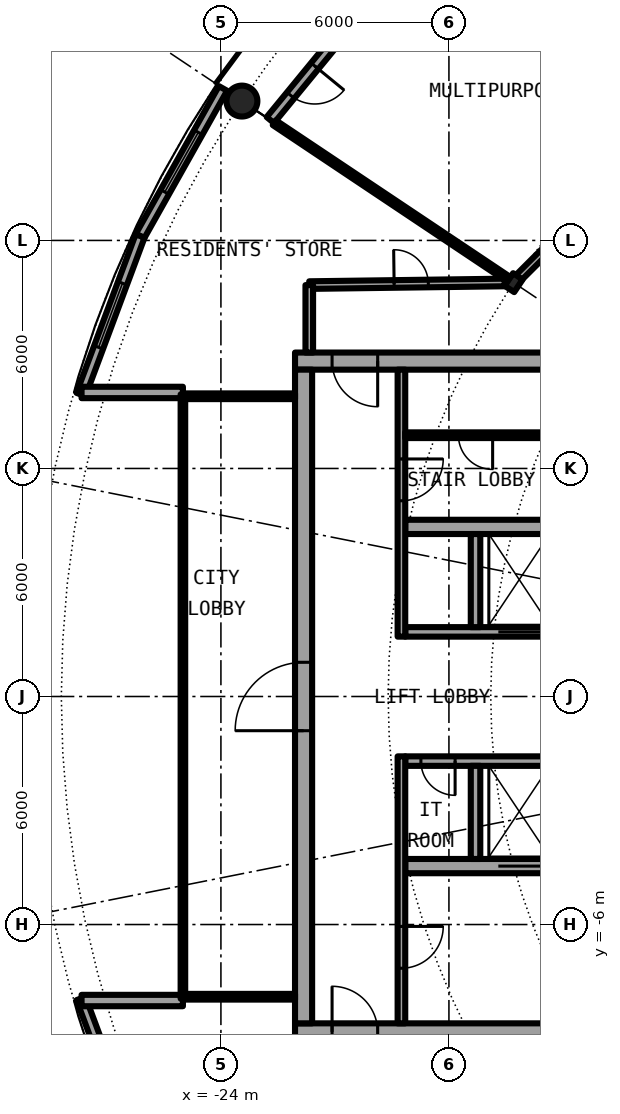
"""IFC4 building model, lengths in metres.
Left out: names, types, materials, properties, quantities, classifications, styles, units other than length and angle.
Written with IfcOpenShell. Run it as: python <this file> out.ifc"""

import sys

from ifc_helpers import new_model, si_unit, direction, frame, frame_2d, origin, origin_2d, place, context, subcontext, project, spatial, rectangle, hollow_circle, i_section, extrude, element, fill, save


model = new_model("IFC4")
c1 = context("Model", 3, precision=1e-05, world=origin(), true_north=direction((0.0, 1.0)))
c2 = subcontext(c1, "Body", "Model", "MODEL_VIEW")
j1 = project(units=[si_unit("LENGTHUNIT", "METRE"), si_unit("PLANEANGLEUNIT", "RADIAN")], contexts=[c1])
p1 = place(None, origin())
s1 = spatial("IfcSite", under=j1, at=p1, CompositionType="ELEMENT")
p2 = place(p1, origin())
s2 = spatial("IfcBuilding", under=s1, at=p2, CompositionType="ELEMENT")
p3 = place(p2, frame((0.0, 0.0, 208.5)))
s3 = spatial("IfcBuildingStorey", under=s2, at=p3, CompositionType="ELEMENT", Elevation=208.5)
p4 = place(p3, frame((-23.448, 15.667, 0.0), z_axis=(0.0, 0.0, 1.0), x_axis=(1.0, 0.0, 0.0)))
e1 = element("IfcColumn", 1, at=p4, inside=s3, PredefinedType="COLUMN", context=c2, shape_type="SweptSolid", body=[
    extrude(hollow_circle(Radius=0.406, WallThickness=0.03, at=origin_2d()), origin(), (0.0, 0.0, 1.0), 4.2),
])
p5 = place(p3, frame((-16.297, 10.889, 0.0), z_axis=(0.0, 0.0, 1.0), x_axis=(-0.831469612303, 0.55557023302, 0.0)))
e2 = element("IfcColumn", 2, at=p5, inside=s3, PredefinedType="COLUMN", context=c2, shape_type="SweptSolid", body=[
    extrude(i_section(OverallWidth=0.3, OverallDepth=0.4, WebThickness=0.013, FlangeThickness=0.024, FilletRadius=0.027, at=origin_2d()), origin(), (0.0, 0.0, 1.0), 4.2),
])
p6 = place(p3, frame((-19.304, 19.304, 0.0), z_axis=(0.0, 0.0, 1.0), x_axis=(-0.634382322723, -0.773019449054, 0.0)))
e3 = element("IfcWall", 3, at=p6, inside=s3, PredefinedType="SOLIDWALL", context=c2, shape_type="SweptSolid", body=[
    extrude(rectangle(XDim=5.352, YDim=0.25, at=frame_2d((2.676, 0.0))), origin(), (0.0, 0.0, 1.0), 3.85),
])
p7 = place(p6, frame((0.841, 0.0, 0.0)))
e4 = element("IfcOpeningElement", 4, at=p7, cuts=e3, PredefinedType="OPENING", context=c2, shape_type="SweptSolid", body=[
    extrude(rectangle(XDim=1.0, YDim=2.2, at=frame_2d((0.5, 1.1))), frame((0.0, 0.135, 0.0), z_axis=(0.0, -1.0, 0.0), x_axis=(1.0, 0.0, 0.0)), (0.0, 0.0, 1.0), 0.27),
])
p8 = place(p6, frame((3.51, 0.0, 0.0)))
e5 = element("IfcOpeningElement", 5, at=p8, cuts=e3, PredefinedType="OPENING", context=c2, shape_type="SweptSolid", body=[
    extrude(rectangle(XDim=1.0, YDim=2.2, at=frame_2d((0.5, 1.1))), frame((0.0, 0.135, 0.0), z_axis=(0.0, -1.0, 0.0), x_axis=(1.0, 0.0, 0.0)), (0.0, 0.0, 1.0), 0.27),
])
p9 = place(p3, frame((-27.682, -7.945, 0.0), z_axis=(0.0, 0.0, 1.0), x_axis=(0.349247811493, -0.937030397675, 0.0)))
e6 = element("IfcWall", 6, at=p9, inside=s3, PredefinedType="SOLIDWALL", context=c2, shape_type="SweptSolid", body=[
    extrude(rectangle(XDim=4.452, YDim=0.25, at=frame_2d((2.226, 0.0))), origin(), (0.0, 0.0, 1.0), 3.85),
])
p10 = place(p9, frame((1.327, 0.0, 0.3)))
e7 = element("IfcOpeningElement", 7, at=p10, cuts=e6, PredefinedType="OPENING", context=c2, shape_type="SweptSolid", body=[
    extrude(rectangle(XDim=1.8, YDim=2.1, at=frame_2d((0.9, 1.05))), frame((0.0, 0.135, 0.0), z_axis=(0.0, -1.0, 0.0), x_axis=(1.0, 0.0, 0.0)), (0.0, 0.0, 1.0), 0.27),
])
p11 = place(p3, frame((-23.946, 16.0, 0.0), z_axis=(0.0, 0.0, 1.0), x_axis=(-0.489696356642, -0.871893042919, 0.0)))
e8 = element("IfcWall", 8, at=p11, inside=s3, PredefinedType="SOLIDWALL", context=c2, shape_type="SweptSolid", body=[
    extrude(rectangle(XDim=4.454, YDim=0.25, at=frame_2d((2.227, 0.0))), origin(), (0.0, 0.0, 1.0), 3.85),
])
p12 = place(p11, frame((1.327, 0.0, 0.3)))
e9 = element("IfcOpeningElement", 9, at=p12, cuts=e8, PredefinedType="OPENING", context=c2, shape_type="SweptSolid", body=[
    extrude(rectangle(XDim=1.8, YDim=2.1, at=frame_2d((0.9, 1.05))), frame((0.0, 0.135, 0.0), z_axis=(0.0, -1.0, 0.0), x_axis=(1.0, 0.0, 0.0)), (0.0, 0.0, 1.0), 0.27),
])
p13 = place(p3, frame((-26.127, 12.117, 0.0), z_axis=(0.0, 0.0, 1.0), x_axis=(-0.349247811493, -0.937030397675, 0.0)))
e10 = element("IfcWall", 10, at=p13, inside=s3, PredefinedType="SOLIDWALL", context=c2, shape_type="SweptSolid", body=[
    extrude(rectangle(XDim=4.452, YDim=0.25, at=frame_2d((2.226, 0.0))), origin(), (0.0, 0.0, 1.0), 3.85),
])
p14 = place(p13, frame((1.327, 0.0, 0.3)))
e11 = element("IfcOpeningElement", 11, at=p14, cuts=e10, PredefinedType="OPENING", context=c2, shape_type="SweptSolid", body=[
    extrude(rectangle(XDim=1.8, YDim=2.1, at=frame_2d((0.9, 1.05))), frame((0.0, 0.135, 0.0), z_axis=(0.0, -1.0, 0.0), x_axis=(1.0, 0.0, 0.0)), (0.0, 0.0, 1.0), 0.27),
])
for number, where, z_axis, x_axis in (
    (12, (-25.0, 8.0, 0.0), (0.0, 0.0, 1.0), (-1.0, 0.0, 0.0)),
    (13, (-25.0, -8.0, 0.0), (0.0, 0.0, 1.0), (-1.0, 0.0, 0.0)),
):
    element("IfcWall", number, at=place(p3, frame(where, z_axis=z_axis, x_axis=x_axis)), inside=s3, PredefinedType="SOLIDWALL", context=c2, shape_type="SweptSolid", body=[
        extrude(rectangle(XDim=2.667, YDim=0.3, at=frame_2d((1.333, 0.0))), origin(), (0.0, 0.0, 1.0), 3.85),
    ])
p15 = place(p3, frame((-22.05, -8.825, 0.0), z_axis=(0.0, 0.0, 1.0), x_axis=(1.0, 0.0, 0.0)))
e14 = element("IfcWall", 14, at=p15, inside=s3, PredefinedType="SHEAR", context=c2, shape_type="SweptSolid", body=[
    extrude(rectangle(XDim=13.5, YDim=0.45, at=frame_2d((6.75, 0.0))), origin(), (0.0, 0.0, 1.0), 4.2),
])
p16 = place(p15, frame((0.975, 0.0, 0.0)))
e15 = element("IfcOpeningElement", 15, at=p16, cuts=e14, PredefinedType="OPENING", context=c2, shape_type="SweptSolid", body=[
    extrude(rectangle(XDim=1.2, YDim=2.3, at=frame_2d((0.6, 1.15))), frame((0.0, 0.235, 0.0), z_axis=(0.0, -1.0, 0.0), x_axis=(1.0, 0.0, 0.0)), (0.0, 0.0, 1.0), 0.47),
])
p17 = place(p3, frame((-8.55, 8.825, 0.0), z_axis=(0.0, 0.0, 1.0), x_axis=(-1.0, 0.0, 0.0)))
e16 = element("IfcWall", 16, at=p17, inside=s3, PredefinedType="SHEAR", context=c2, shape_type="SweptSolid", body=[
    extrude(rectangle(XDim=13.5, YDim=0.45, at=frame_2d((6.75, 0.0))), origin(), (0.0, 0.0, 1.0), 4.2),
])
p18 = place(p17, frame((11.325, 0.0, 0.0)))
e17 = element("IfcOpeningElement", 17, at=p18, cuts=e16, PredefinedType="OPENING", context=c2, shape_type="SweptSolid", body=[
    extrude(rectangle(XDim=1.2, YDim=2.3, at=frame_2d((0.6, 1.15))), frame((0.0, 0.235, 0.0), z_axis=(0.0, -1.0, 0.0), x_axis=(1.0, 0.0, 0.0)), (0.0, 0.0, 1.0), 0.47),
])
p19 = place(p3, frame((-21.825, -8.6, 0.0), z_axis=(0.0, 0.0, 1.0), x_axis=(0.0, 1.0, 0.0)))
e18 = element("IfcWall", 18, at=p19, inside=s3, PredefinedType="SHEAR", context=c2, shape_type="SweptSolid", body=[
    extrude(rectangle(XDim=17.2, YDim=0.45, at=frame_2d((8.6, 0.0))), origin(), (0.0, 0.0, 1.0), 4.2),
])
p20 = place(p19, frame((7.7, 0.0, 0.0)))
e19 = element("IfcOpeningElement", 19, at=p20, cuts=e18, PredefinedType="OPENING", context=c2, shape_type="SweptSolid", body=[
    extrude(rectangle(XDim=1.8, YDim=2.3, at=frame_2d((0.9, 1.15))), frame((0.0, 0.235, 0.0), z_axis=(0.0, -1.0, 0.0), x_axis=(1.0, 0.0, 0.0)), (0.0, 0.0, 1.0), 0.47),
])
p21 = place(p3, frame((-9.0, -1.7, 0.0), z_axis=(0.0, 0.0, 1.0), x_axis=(-1.0, 0.0, 0.0)))
e20 = element("IfcWall", 20, at=p21, inside=s3, PredefinedType="SHEAR", context=c2, shape_type="SweptSolid", body=[
    extrude(rectangle(XDim=10.15, YDim=0.25, at=frame_2d((5.075, 0.0))), origin(), (0.0, 0.0, 1.0), 4.2),
])
p22 = place(p21, frame((0.762, 0.0, 0.0)))
e21 = element("IfcOpeningElement", 21, at=p22, cuts=e20, PredefinedType="OPENING", context=c2, shape_type="SweptSolid", body=[
    extrude(rectangle(XDim=0.9, YDim=2.3, at=frame_2d((0.45, 1.15))), frame((0.0, 0.135, 0.0), z_axis=(0.0, -1.0, 0.0), x_axis=(1.0, 0.0, 0.0)), (0.0, 0.0, 1.0), 0.27),
])
p23 = place(p21, frame((3.775, 0.0, 0.0)))
e22 = element("IfcOpeningElement", 22, at=p23, cuts=e20, PredefinedType="OPENING", context=c2, shape_type="SweptSolid", body=[
    extrude(rectangle(XDim=0.9, YDim=2.3, at=frame_2d((0.45, 1.15))), frame((0.0, 0.135, 0.0), z_axis=(0.0, -1.0, 0.0), x_axis=(1.0, 0.0, 0.0)), (0.0, 0.0, 1.0), 0.27),
])
p24 = place(p21, frame((8.837, 0.0, 0.0)))
e23 = element("IfcOpeningElement", 23, at=p24, cuts=e20, PredefinedType="OPENING", context=c2, shape_type="SweptSolid", body=[
    extrude(rectangle(XDim=0.9, YDim=2.3, at=frame_2d((0.45, 1.15))), frame((0.0, 0.135, 0.0), z_axis=(0.0, -1.0, 0.0), x_axis=(1.0, 0.0, 0.0)), (0.0, 0.0, 1.0), 0.27),
])
p25 = place(p3, frame((-9.0, -4.462, 0.0), z_axis=(0.0, 0.0, 1.0), x_axis=(-1.0, 0.0, 0.0)))
e24 = element("IfcWall", 24, at=p25, inside=s3, PredefinedType="SHEAR", context=c2, shape_type="SweptSolid", body=[
    extrude(rectangle(XDim=10.15, YDim=0.375, at=frame_2d((5.075, 0.0))), origin(), (0.0, 0.0, 1.0), 4.2),
])
p26 = place(p25, frame((6.6, 0.0, 0.0)))
e25 = element("IfcOpeningElement", 25, at=p26, cuts=e24, PredefinedType="OPENING", context=c2, shape_type="SweptSolid", body=[
    extrude(rectangle(XDim=1.1, YDim=2.3, at=frame_2d((0.55, 1.15))), frame((0.0, 0.198, 0.0), z_axis=(0.0, -1.0, 0.0), x_axis=(1.0, 0.0, 0.0)), (0.0, 0.0, 1.0), 0.395),
])
p27 = place(p3, frame((-17.3, -1.825, 0.0), z_axis=(0.0, 0.0, 1.0), x_axis=(0.0, -1.0, 0.0)))
e26 = element("IfcWall", 26, at=p27, inside=s3, PredefinedType="SOLIDWALL", context=c2, shape_type="SweptSolid", body=[
    extrude(rectangle(XDim=2.45, YDim=0.25, at=frame_2d((1.225, 0.0))), origin(), (0.0, 0.0, 1.0), 3.85),
])
p28 = place(p3, frame((-19.25, -1.575, 0.0), z_axis=(0.0, 0.0, 1.0), x_axis=(0.0, -1.0, 0.0)))
e27 = element("IfcWall", 27, at=p28, inside=s3, PredefinedType="SOLIDWALL", context=c2, shape_type="SweptSolid", body=[
    extrude(rectangle(XDim=7.025, YDim=0.2, at=frame_2d((3.513, 0.0))), origin(), (0.0, 0.0, 1.0), 3.85),
])
p29 = place(p28, frame((4.475, 0.0, 0.0)))
e28 = element("IfcOpeningElement", 28, at=p29, cuts=e27, PredefinedType="OPENING", context=c2, shape_type="SweptSolid", body=[
    extrude(rectangle(XDim=1.1, YDim=2.3, at=frame_2d((0.55, 1.15))), frame((0.0, 0.11, 0.0), z_axis=(0.0, -1.0, 0.0), x_axis=(1.0, 0.0, 0.0)), (0.0, 0.0, 1.0), 0.22),
])
p30 = place(p3, frame((-9.0, 1.7, 0.0), z_axis=(0.0, 0.0, 1.0), x_axis=(-1.0, 0.0, 0.0)))
e29 = element("IfcWall", 29, at=p30, inside=s3, PredefinedType="SHEAR", context=c2, shape_type="SweptSolid", body=[
    extrude(rectangle(XDim=10.15, YDim=0.25, at=frame_2d((5.075, 0.0))), origin(), (0.0, 0.0, 1.0), 4.2),
])
p31 = place(p30, frame((0.387, 0.0, 0.0)))
e30 = element("IfcOpeningElement", 30, at=p31, cuts=e29, PredefinedType="OPENING", context=c2, shape_type="SweptSolid", body=[
    extrude(rectangle(XDim=1.1, YDim=2.3, at=frame_2d((0.55, 1.15))), frame((0.0, 0.135, 0.0), z_axis=(0.0, -1.0, 0.0), x_axis=(1.0, 0.0, 0.0)), (0.0, 0.0, 1.0), 0.27),
])
p32 = place(p30, frame((2.45, 0.0, 0.0)))
e31 = element("IfcOpeningElement", 31, at=p32, cuts=e29, PredefinedType="OPENING", context=c2, shape_type="SweptSolid", body=[
    extrude(rectangle(XDim=1.1, YDim=2.3, at=frame_2d((0.55, 1.15))), frame((0.0, 0.135, 0.0), z_axis=(0.0, -1.0, 0.0), x_axis=(1.0, 0.0, 0.0)), (0.0, 0.0, 1.0), 0.27),
])
p33 = place(p30, frame((4.45, 0.0, 0.0)))
e32 = element("IfcOpeningElement", 32, at=p33, cuts=e29, PredefinedType="OPENING", context=c2, shape_type="SweptSolid", body=[
    extrude(rectangle(XDim=1.1, YDim=2.3, at=frame_2d((0.55, 1.15))), frame((0.0, 0.135, 0.0), z_axis=(0.0, -1.0, 0.0), x_axis=(1.0, 0.0, 0.0)), (0.0, 0.0, 1.0), 0.27),
])
p34 = place(p30, frame((6.6, 0.0, 0.0)))
e33 = element("IfcOpeningElement", 33, at=p34, cuts=e29, PredefinedType="OPENING", context=c2, shape_type="SweptSolid", body=[
    extrude(rectangle(XDim=1.1, YDim=2.3, at=frame_2d((0.55, 1.15))), frame((0.0, 0.135, 0.0), z_axis=(0.0, -1.0, 0.0), x_axis=(1.0, 0.0, 0.0)), (0.0, 0.0, 1.0), 0.27),
])
p35 = place(p3, frame((-9.0, 4.462, 0.0), z_axis=(0.0, 0.0, 1.0), x_axis=(-1.0, 0.0, 0.0)))
e34 = element("IfcWall", 34, at=p35, inside=s3, PredefinedType="SHEAR", context=c2, shape_type="SweptSolid", body=[
    extrude(rectangle(XDim=10.15, YDim=0.375, at=frame_2d((5.075, 0.0))), origin(), (0.0, 0.0, 1.0), 4.2),
])
p36 = place(p3, frame((-17.3, 1.825, 0.0), z_axis=(0.0, 0.0, 1.0), x_axis=(0.0, 1.0, 0.0)))
e35 = element("IfcWall", 35, at=p36, inside=s3, PredefinedType="SOLIDWALL", context=c2, shape_type="SweptSolid", body=[
    extrude(rectangle(XDim=2.45, YDim=0.25, at=frame_2d((1.225, 0.0))), origin(), (0.0, 0.0, 1.0), 3.85),
])
p37 = place(p3, frame((-19.25, 8.6, 0.0), z_axis=(0.0, 0.0, 1.0), x_axis=(0.0, -1.0, 0.0)))
e36 = element("IfcWall", 36, at=p37, inside=s3, PredefinedType="SOLIDWALL", context=c2, shape_type="SweptSolid", body=[
    extrude(rectangle(XDim=7.025, YDim=0.2, at=frame_2d((3.513, 0.0))), origin(), (0.0, 0.0, 1.0), 3.85),
])
p38 = place(p37, frame((2.35, 0.0, 0.0)))
e37 = element("IfcOpeningElement", 37, at=p38, cuts=e36, PredefinedType="OPENING", context=c2, shape_type="SweptSolid", body=[
    extrude(rectangle(XDim=1.1, YDim=2.3, at=frame_2d((0.55, 1.15))), frame((0.0, 0.11, 0.0), z_axis=(0.0, -1.0, 0.0), x_axis=(1.0, 0.0, 0.0)), (0.0, 0.0, 1.0), 0.22),
])
p39 = place(p3, frame((-15.45, 6.875, 0.0), z_axis=(0.0, 0.0, 1.0), x_axis=(-1.0, 0.0, 0.0)))
e38 = element("IfcWall", 38, at=p39, inside=s3, PredefinedType="PARTITIONING", context=c2, shape_type="SweptSolid", body=[
    extrude(rectangle(XDim=3.7, YDim=0.15, at=frame_2d((1.85, 0.0))), origin(), (0.0, 0.0, 1.0), 3.85),
])
p40 = place(p39, frame((1.4, 0.0, 0.0)))
e39 = element("IfcOpeningElement", 39, at=p40, cuts=e38, PredefinedType="OPENING", context=c2, shape_type="SweptSolid", body=[
    extrude(rectangle(XDim=0.9, YDim=2.3, at=frame_2d((0.45, 1.15))), frame((0.0, 0.085, 0.0), z_axis=(0.0, -1.0, 0.0), x_axis=(1.0, 0.0, 0.0)), (0.0, 0.0, 1.0), 0.17),
])
for number, where, z_axis, x_axis in (
    (40, (-22.05, 7.9, 0.0), (0.0, 0.0, 1.0), (-1.0, 0.0, 0.0)),
    (41, (-22.05, -7.9, 0.0), (0.0, 0.0, 1.0), (-1.0, 0.0, 0.0)),
):
    element("IfcWall", number, at=place(p3, frame(where, z_axis=z_axis, x_axis=x_axis)), inside=s3, PredefinedType="PARTITIONING", context=c2, shape_type="SweptSolid", body=[
        extrude(rectangle(XDim=2.89, YDim=0.15, at=frame_2d((1.445, 0.0))), origin(), (0.0, 0.0, 1.0), 3.85),
    ])
p41 = place(p3, frame((-25.0, 7.95, 0.0), z_axis=(0.0, 0.0, 1.0), x_axis=(0.0, -1.0, 0.0)))
e42 = element("IfcWall", 42, at=p41, inside=s3, PredefinedType="PARTITIONING", context=c2, shape_type="SweptSolid", body=[
    extrude(rectangle(XDim=15.9, YDim=0.12, at=frame_2d((7.95, 0.0))), origin(), (0.0, 0.0, 1.0), 3.85),
])
p42 = place(p41, frame((0.95, 0.0, 0.1)))
e43 = element("IfcOpeningElement", 43, at=p42, cuts=e42, PredefinedType="OPENING", context=c2, shape_type="SweptSolid", body=[
    extrude(rectangle(XDim=14.0, YDim=3.5, at=frame_2d((7.0, 1.75))), frame((0.0, 0.07, 0.0), z_axis=(0.0, -1.0, 0.0), x_axis=(1.0, 0.0, 0.0)), (0.0, 0.0, 1.0), 0.14),
])
p43 = place(p3, frame((-22.595, 15.098, 0.0), z_axis=(0.0, 0.0, 1.0), x_axis=(0.831433566583, -0.555624175463, 0.0)))
e44 = element("IfcWall", 44, at=p43, inside=s3, PredefinedType="PARTITIONING", context=c2, shape_type="SweptSolid", body=[
    extrude(rectangle(XDim=7.375, YDim=0.15, at=frame_2d((3.688, 0.0))), origin(), (0.0, 0.0, 1.0), 3.85),
])
p44 = place(p3, frame((-21.675, 10.825, 0.0), z_axis=(0.0, 0.0, 1.0), x_axis=(0.999909707888, 0.013437859594, 0.0)))
e45 = element("IfcWall", 45, at=p44, inside=s3, PredefinedType="PARTITIONING", context=c2, shape_type="SweptSolid", body=[
    extrude(rectangle(XDim=5.142, YDim=0.2, at=frame_2d((2.571, 0.0))), origin(), (0.0, 0.0, 1.0), 3.85),
])
p45 = place(p44, frame((2.233, 0.0, 0.0)))
e46 = element("IfcOpeningElement", 46, at=p45, cuts=e45, PredefinedType="OPENING", context=c2, shape_type="SweptSolid", body=[
    extrude(rectangle(XDim=0.9, YDim=2.3, at=frame_2d((0.45, 1.15))), frame((0.0, 0.11, 0.0), z_axis=(0.0, -1.0, 0.0), x_axis=(1.0, 0.0, 0.0)), (0.0, 0.0, 1.0), 0.22),
])
p46 = place(p3, frame((-16.189, 10.997, 0.0), z_axis=(0.0, 0.0, 1.0), x_axis=(0.707106781187, 0.707106781187, 0.0)))
e47 = element("IfcWall", 47, at=p46, inside=s3, PredefinedType="PARTITIONING", context=c2, shape_type="SweptSolid", body=[
    extrude(rectangle(XDim=7.343, YDim=0.2, at=frame_2d((3.671, 0.0))), origin(), (0.0, 0.0, 1.0), 3.6),
])
p47 = place(p46, frame((3.171, 0.0, 0.0)))
e48 = element("IfcOpeningElement", 48, at=p47, cuts=e47, PredefinedType="OPENING", context=c2, shape_type="SweptSolid", body=[
    extrude(rectangle(XDim=1.0, YDim=2.3, at=frame_2d((0.5, 1.15))), frame((0.0, 0.11, 0.0), z_axis=(0.0, -1.0, 0.0), x_axis=(1.0, 0.0, 0.0)), (0.0, 0.0, 1.0), 0.22),
])
p48 = place(p3, frame((-21.675, 9.05, 0.0), z_axis=(0.0, 0.0, 1.0), x_axis=(0.0, 1.0, 0.0)))
e49 = element("IfcWall", 49, at=p48, inside=s3, PredefinedType="PARTITIONING", context=c2, shape_type="SweptSolid", body=[
    extrude(rectangle(XDim=1.775, YDim=0.2, at=frame_2d((0.887, 0.0))), origin(), (0.0, 0.0, 1.0), 3.85),
])
p49 = place(p8, origin())
e50 = element("IfcDoor", 50, at=p49, inside=s3, OperationType="SINGLE_SWING_LEFT", PredefinedType="DOOR", context=c2, shape_type="SweptSolid", body=[
    extrude(rectangle(XDim=1.0, YDim=2.2, at=frame_2d((0.5, 1.1))), frame((0.0, 0.025, 0.0), z_axis=(0.0, -1.0, 0.0), x_axis=(1.0, 0.0, 0.0)), (0.0, 0.0, 1.0), 0.05),
])
fill(e5, e50)
p50 = place(p12, origin())
e51 = element("IfcWindow", 51, at=p50, inside=s3, PartitioningType="SINGLE_PANEL", PredefinedType="WINDOW", context=c2, shape_type="SweptSolid", body=[
    extrude(rectangle(XDim=1.8, YDim=2.1, at=frame_2d((0.9, 1.05))), frame((0.0, 0.03, 0.0), z_axis=(0.0, -1.0, 0.0), x_axis=(1.0, 0.0, 0.0)), (0.0, 0.0, 1.0), 0.06),
])
fill(e9, e51)
p51 = place(p14, origin())
e52 = element("IfcWindow", 52, at=p51, inside=s3, PartitioningType="SINGLE_PANEL", PredefinedType="WINDOW", context=c2, shape_type="SweptSolid", body=[
    extrude(rectangle(XDim=1.8, YDim=2.1, at=frame_2d((0.9, 1.05))), frame((0.0, 0.03, 0.0), z_axis=(0.0, -1.0, 0.0), x_axis=(1.0, 0.0, 0.0)), (0.0, 0.0, 1.0), 0.06),
])
fill(e11, e52)
p52 = place(p26, origin())
e53 = element("IfcDoor", 53, at=p52, inside=s3, OperationType="DOUBLE_DOOR_SLIDING", PredefinedType="DOOR", context=c2, shape_type="SweptSolid", body=[
    extrude(rectangle(XDim=1.1, YDim=2.3, at=frame_2d((0.55, 1.15))), frame((0.0, 0.025, 0.0), z_axis=(0.0, -1.0, 0.0), x_axis=(1.0, 0.0, 0.0)), (0.0, 0.0, 1.0), 0.05),
])
fill(e25, e53)
p53 = place(p34, origin())
e54 = element("IfcDoor", 54, at=p53, inside=s3, OperationType="DOUBLE_DOOR_SLIDING", PredefinedType="DOOR", context=c2, shape_type="SweptSolid", body=[
    extrude(rectangle(XDim=1.1, YDim=2.3, at=frame_2d((0.55, 1.15))), frame((0.0, 0.025, 0.0), z_axis=(0.0, -1.0, 0.0), x_axis=(1.0, 0.0, 0.0)), (0.0, 0.0, 1.0), 0.05),
])
fill(e33, e54)
p54 = place(p24, origin())
e55 = element("IfcDoor", 55, at=p54, inside=s3, OperationType="SINGLE_SWING_LEFT", PredefinedType="DOOR", context=c2, shape_type="SweptSolid", body=[
    extrude(rectangle(XDim=0.9, YDim=2.3, at=frame_2d((0.45, 1.15))), frame((0.0, 0.025, 0.0), z_axis=(0.0, -1.0, 0.0), x_axis=(1.0, 0.0, 0.0)), (0.0, 0.0, 1.0), 0.05),
])
fill(e23, e55)
p55 = place(p40, origin())
e56 = element("IfcDoor", 56, at=p55, inside=s3, OperationType="SINGLE_SWING_LEFT", PredefinedType="DOOR", context=c2, shape_type="SweptSolid", body=[
    extrude(rectangle(XDim=0.9, YDim=2.3, at=frame_2d((0.45, 1.15))), frame((0.0, 0.025, 0.0), z_axis=(0.0, -1.0, 0.0), x_axis=(1.0, 0.0, 0.0)), (0.0, 0.0, 1.0), 0.05),
])
fill(e39, e56)
p56 = place(p29, origin())
e57 = element("IfcDoor", 57, at=p56, inside=s3, OperationType="SINGLE_SWING_LEFT", PredefinedType="DOOR", context=c2, shape_type="SweptSolid", body=[
    extrude(rectangle(XDim=1.1, YDim=2.3, at=frame_2d((0.55, 1.15))), frame((0.0, 0.025, 0.0), z_axis=(0.0, -1.0, 0.0), x_axis=(1.0, 0.0, 0.0)), (0.0, 0.0, 1.0), 0.05),
])
fill(e28, e57)
p57 = place(p38, origin())
e58 = element("IfcDoor", 58, at=p57, inside=s3, OperationType="SINGLE_SWING_RIGHT", PredefinedType="DOOR", context=c2, shape_type="SweptSolid", body=[
    extrude(rectangle(XDim=1.1, YDim=2.3, at=frame_2d((0.55, 1.15))), frame((0.0, 0.025, 0.0), z_axis=(0.0, -1.0, 0.0), x_axis=(1.0, 0.0, 0.0)), (0.0, 0.0, 1.0), 0.05),
])
fill(e37, e58)
p58 = place(p16, origin())
e59 = element("IfcDoor", 59, at=p58, inside=s3, OperationType="SINGLE_SWING_RIGHT", PredefinedType="DOOR", context=c2, shape_type="SweptSolid", body=[
    extrude(rectangle(XDim=1.2, YDim=2.3, at=frame_2d((0.6, 1.15))), frame((0.0, 0.025, 0.0), z_axis=(0.0, -1.0, 0.0), x_axis=(1.0, 0.0, 0.0)), (0.0, 0.0, 1.0), 0.05),
])
fill(e15, e59)
p59 = place(p18, origin())
e60 = element("IfcDoor", 60, at=p59, inside=s3, OperationType="SINGLE_SWING_LEFT", PredefinedType="DOOR", context=c2, shape_type="SweptSolid", body=[
    extrude(rectangle(XDim=1.2, YDim=2.3, at=frame_2d((0.6, 1.15))), frame((0.0, 0.025, 0.0), z_axis=(0.0, -1.0, 0.0), x_axis=(1.0, 0.0, 0.0)), (0.0, 0.0, 1.0), 0.05),
])
fill(e17, e60)
p60 = place(p20, origin())
e61 = element("IfcDoor", 61, at=p60, inside=s3, OperationType="SINGLE_SWING_LEFT", PredefinedType="DOOR", context=c2, shape_type="SweptSolid", body=[
    extrude(rectangle(XDim=1.8, YDim=2.3, at=frame_2d((0.9, 1.15))), frame((0.0, 0.025, 0.0), z_axis=(0.0, -1.0, 0.0), x_axis=(1.0, 0.0, 0.0)), (0.0, 0.0, 1.0), 0.05),
])
fill(e19, e61)
p61 = place(p42, origin())
e62 = element("IfcWindow", 62, at=p61, inside=s3, PartitioningType="SINGLE_PANEL", PredefinedType="WINDOW", context=c2, shape_type="SweptSolid", body=[
    extrude(rectangle(XDim=14.0, YDim=3.5, at=frame_2d((7.0, 1.75))), frame((0.0, 0.03, 0.0), z_axis=(0.0, -1.0, 0.0), x_axis=(1.0, 0.0, 0.0)), (0.0, 0.0, 1.0), 0.06),
])
fill(e43, e62)
p62 = place(p45, origin())
e63 = element("IfcDoor", 63, at=p62, inside=s3, OperationType="SINGLE_SWING_RIGHT", PredefinedType="DOOR", context=c2, shape_type="SweptSolid", body=[
    extrude(rectangle(XDim=0.9, YDim=2.3, at=frame_2d((0.45, 1.15))), frame((0.0, 0.025, 0.0), z_axis=(0.0, -1.0, 0.0), x_axis=(1.0, 0.0, 0.0)), (0.0, 0.0, 1.0), 0.05),
])
fill(e46, e63)
save(model, sys.argv[1])
